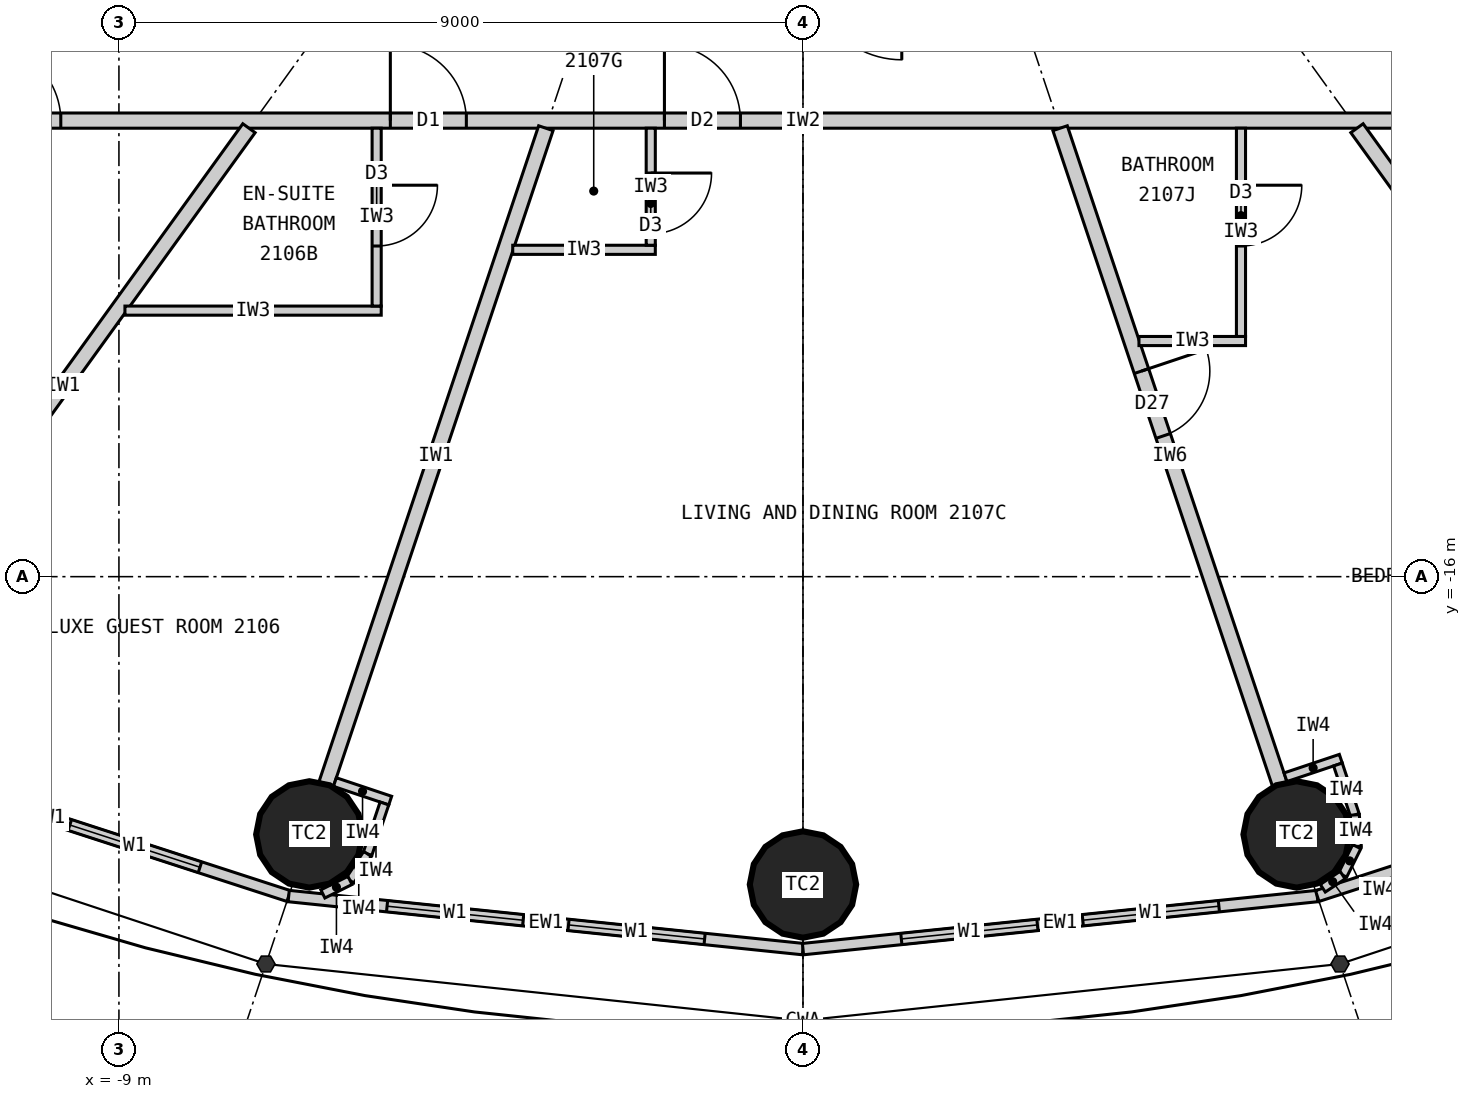
"""IFC4 building model, lengths in metres.
Left out: names, types, materials, properties, quantities, classifications, styles, units other than length and angle.
Written with IfcOpenShell. Run it as: python <this file> out.ifc"""

import sys

from ifc_helpers import new_model, si_unit, direction, frame, frame_2d, origin, origin_2d, place, context, subcontext, project, spatial, rectangle, circle, extrude, element, fill, save


model = new_model("IFC4")
c1 = context("Model", 3, precision=1e-05, world=origin(), true_north=direction((0.0, 1.0)))
c2 = subcontext(c1, "Body", "Model", "MODEL_VIEW")
j1 = project(units=[si_unit("LENGTHUNIT", "METRE"), si_unit("PLANEANGLEUNIT", "RADIAN")], contexts=[c1])
p1 = place(None, origin())
s1 = spatial("IfcSite", under=j1, at=p1, CompositionType="ELEMENT")
p2 = place(p1, origin())
s2 = spatial("IfcBuilding", under=s1, at=p2, CompositionType="ELEMENT")
p3 = place(p2, frame((0.0, 0.0, 83.7)))
s3 = spatial("IfcBuildingStorey", under=s2, at=p3, CompositionType="ELEMENT", Elevation=83.7)
for number, where, z_axis, x_axis in (
    (1, (-6.495, -19.391, 0.0), (0.0, 0.0, 1.0), (1.0, 0.0, 0.0)),
    (2, (0.0, -20.05, 0.0), (0.0, 0.0, 1.0), (1.0, 0.0, 0.0)),
    (3, (6.495, -19.391, 0.0), (0.0, 0.0, 1.0), (1.0, 0.0, 0.0)),
):
    element("IfcColumn", number, at=place(p3, frame(where, z_axis=z_axis, x_axis=x_axis)), inside=s3, PredefinedType="COLUMN", context=c2, shape_type="SweptSolid", body=[
        extrude(circle(Radius=0.7, at=origin_2d()), origin(), (0.0, 0.0, 1.0), 3.3),
    ])
p4 = place(p3, frame((-13.096, -18.147, 0.0), z_axis=(0.0, 0.0, 1.0), x_axis=(0.951137534625, -0.308767534285, 0.0)))
e4 = element("IfcWall", 4, at=p4, inside=s3, PredefinedType="ELEMENTEDWALL", context=c2, shape_type="SweptSolid", body=[
    extrude(rectangle(XDim=6.655, YDim=0.15, at=frame_2d((3.328, 0.0))), origin(), (0.0, 0.0, 1.0), 3.12),
])
p5 = place(p4, frame((1.228, 0.0, 0.9)))
e5 = element("IfcOpeningElement", 5, at=p5, cuts=e4, PredefinedType="OPENING", context=c2, shape_type="SweptSolid", body=[
    extrude(rectangle(XDim=1.8, YDim=1.9, at=frame_2d((0.9, 0.95))), frame((0.0, 0.085, 0.0), z_axis=(0.0, -1.0, 0.0), x_axis=(1.0, 0.0, 0.0)), (0.0, 0.0, 1.0), 0.17),
])
p6 = place(p4, frame((3.628, 0.0, 0.9)))
e6 = element("IfcOpeningElement", 6, at=p6, cuts=e4, PredefinedType="OPENING", context=c2, shape_type="SweptSolid", body=[
    extrude(rectangle(XDim=1.8, YDim=1.9, at=frame_2d((0.9, 0.95))), frame((0.0, 0.085, 0.0), z_axis=(0.0, -1.0, 0.0), x_axis=(1.0, 0.0, 0.0)), (0.0, 0.0, 1.0), 0.17),
])
p7 = place(p3, frame((-6.766, -20.202, 0.0), z_axis=(0.0, 0.0, 1.0), x_axis=(0.994721394369, -0.102612609291, 0.0)))
e7 = element("IfcWall", 7, at=p7, inside=s3, PredefinedType="ELEMENTEDWALL", context=c2, shape_type="SweptSolid", body=[
    extrude(rectangle(XDim=6.802, YDim=0.15, at=frame_2d((3.401, 0.0))), origin(), (0.0, 0.0, 1.0), 3.12),
])
p8 = place(p7, frame((1.301, 0.0, 0.9)))
e8 = element("IfcOpeningElement", 8, at=p8, cuts=e7, PredefinedType="OPENING", context=c2, shape_type="SweptSolid", body=[
    extrude(rectangle(XDim=1.8, YDim=1.9, at=frame_2d((0.9, 0.95))), frame((0.0, 0.085, 0.0), z_axis=(0.0, -1.0, 0.0), x_axis=(1.0, 0.0, 0.0)), (0.0, 0.0, 1.0), 0.17),
])
p9 = place(p7, frame((3.701, 0.0, 0.9)))
e9 = element("IfcOpeningElement", 9, at=p9, cuts=e7, PredefinedType="OPENING", context=c2, shape_type="SweptSolid", body=[
    extrude(rectangle(XDim=1.8, YDim=1.9, at=frame_2d((0.9, 0.95))), frame((0.0, 0.085, 0.0), z_axis=(0.0, -1.0, 0.0), x_axis=(1.0, 0.0, 0.0)), (0.0, 0.0, 1.0), 0.17),
])
p10 = place(p3, frame((0.0, -20.9, 0.0), z_axis=(0.0, 0.0, 1.0), x_axis=(0.994721394369, 0.102612609291, 0.0)))
e10 = element("IfcWall", 10, at=p10, inside=s3, PredefinedType="ELEMENTEDWALL", context=c2, shape_type="SweptSolid", body=[
    extrude(rectangle(XDim=6.802, YDim=0.15, at=frame_2d((3.401, 0.0))), origin(), (0.0, 0.0, 1.0), 3.12),
])
p11 = place(p10, frame((1.301, 0.0, 0.9)))
e11 = element("IfcOpeningElement", 11, at=p11, cuts=e10, PredefinedType="OPENING", context=c2, shape_type="SweptSolid", body=[
    extrude(rectangle(XDim=1.8, YDim=1.9, at=frame_2d((0.9, 0.95))), frame((0.0, 0.085, 0.0), z_axis=(0.0, -1.0, 0.0), x_axis=(1.0, 0.0, 0.0)), (0.0, 0.0, 1.0), 0.17),
])
p12 = place(p10, frame((3.701, 0.0, 0.9)))
e12 = element("IfcOpeningElement", 12, at=p12, cuts=e10, PredefinedType="OPENING", context=c2, shape_type="SweptSolid", body=[
    extrude(rectangle(XDim=1.8, YDim=1.9, at=frame_2d((0.9, 0.95))), frame((0.0, 0.085, 0.0), z_axis=(0.0, -1.0, 0.0), x_axis=(1.0, 0.0, 0.0)), (0.0, 0.0, 1.0), 0.17),
])
p13 = place(p3, frame((6.766, -20.202, 0.0), z_axis=(0.0, 0.0, 1.0), x_axis=(0.951137534625, 0.308767534285, 0.0)))
e13 = element("IfcWall", 13, at=p13, inside=s3, PredefinedType="ELEMENTEDWALL", context=c2, shape_type="SweptSolid", body=[
    extrude(rectangle(XDim=6.655, YDim=0.15, at=frame_2d((3.328, 0.0))), origin(), (0.0, 0.0, 1.0), 3.12),
])
p14 = place(p13, frame((1.228, 0.0, 0.9)))
e14 = element("IfcOpeningElement", 14, at=p14, cuts=e13, PredefinedType="OPENING", context=c2, shape_type="SweptSolid", body=[
    extrude(rectangle(XDim=1.8, YDim=1.9, at=frame_2d((0.9, 0.95))), frame((0.0, 0.085, 0.0), z_axis=(0.0, -1.0, 0.0), x_axis=(1.0, 0.0, 0.0)), (0.0, 0.0, 1.0), 0.17),
])
p15 = place(p13, frame((3.628, 0.0, 0.9)))
e15 = element("IfcOpeningElement", 15, at=p15, cuts=e13, PredefinedType="OPENING", context=c2, shape_type="SweptSolid", body=[
    extrude(rectangle(XDim=1.8, YDim=1.9, at=frame_2d((0.9, 0.95))), frame((0.0, 0.085, 0.0), z_axis=(0.0, -1.0, 0.0), x_axis=(1.0, 0.0, 0.0)), (0.0, 0.0, 1.0), 0.17),
])
p16 = place(p3, frame((14.1, -10.0, 0.0), z_axis=(0.0, 0.0, 1.0), x_axis=(-1.0, 0.0, 0.0)))
e16 = element("IfcWall", 16, at=p16, inside=s3, PredefinedType="PARTITIONING", context=c2, shape_type="SweptSolid", body=[
    extrude(rectangle(XDim=28.2, YDim=0.2, at=frame_2d((14.1, 0.0))), origin(), (0.0, 0.0, 1.0), 3.12),
])
p17 = place(p16, frame((23.865, 0.0, 0.0)))
e17 = element("IfcOpeningElement", 17, at=p17, cuts=e16, PredefinedType="OPENING", context=c2, shape_type="SweptSolid", body=[
    extrude(rectangle(XDim=1.0, YDim=2.2, at=frame_2d((0.5, 1.1))), frame((0.0, 0.11, 0.0), z_axis=(0.0, -1.0, 0.0), x_axis=(1.0, 0.0, 0.0)), (0.0, 0.0, 1.0), 0.22),
])
p18 = place(p16, frame((18.529, 0.0, 0.0)))
e18 = element("IfcOpeningElement", 18, at=p18, cuts=e16, PredefinedType="OPENING", context=c2, shape_type="SweptSolid", body=[
    extrude(rectangle(XDim=1.0, YDim=2.2, at=frame_2d((0.5, 1.1))), frame((0.0, 0.11, 0.0), z_axis=(0.0, -1.0, 0.0), x_axis=(1.0, 0.0, 0.0)), (0.0, 0.0, 1.0), 0.22),
])
p19 = place(p16, frame((14.923, 0.0, 0.0)))
e19 = element("IfcOpeningElement", 19, at=p19, cuts=e16, PredefinedType="OPENING", context=c2, shape_type="SweptSolid", body=[
    extrude(rectangle(XDim=1.0, YDim=2.2, at=frame_2d((0.5, 1.1))), frame((0.0, 0.11, 0.0), z_axis=(0.0, -1.0, 0.0), x_axis=(1.0, 0.0, 0.0)), (0.0, 0.0, 1.0), 0.22),
])
p20 = place(p16, frame((2.801, 0.0, 0.0)))
e20 = element("IfcOpeningElement", 20, at=p20, cuts=e16, PredefinedType="OPENING", context=c2, shape_type="SweptSolid", body=[
    extrude(rectangle(XDim=1.0, YDim=2.2, at=frame_2d((0.5, 1.1))), frame((0.0, 0.11, 0.0), z_axis=(0.0, -1.0, 0.0), x_axis=(1.0, 0.0, 0.0)), (0.0, 0.0, 1.0), 0.22),
])
p21 = place(p3, frame((-7.289, -10.1, 0.0), z_axis=(0.0, 0.0, 1.0), x_axis=(-0.585198353053, -0.810890182197, 0.0)))
e21 = element("IfcWall", 21, at=p21, inside=s3, PredefinedType="PARTITIONING", context=c2, shape_type="SweptSolid", body=[
    extrude(rectangle(XDim=8.36, YDim=0.2, at=frame_2d((4.18, 0.0))), origin(), (0.0, 0.0, 1.0), 2.32),
])
p22 = place(p3, frame((-3.383, -10.1, 0.0), z_axis=(0.0, 0.0, 1.0), x_axis=(-0.31759592231, -0.948226149256, 0.0)))
e22 = element("IfcWall", 22, at=p22, inside=s3, PredefinedType="PARTITIONING", context=c2, shape_type="SweptSolid", body=[
    extrude(rectangle(XDim=9.098, YDim=0.2, at=frame_2d((4.549, 0.0))), origin(), (0.0, 0.0, 1.0), 2.32),
])
p23 = place(p3, frame((3.383, -10.1, 0.0), z_axis=(0.0, 0.0, 1.0), x_axis=(0.31759592231, -0.948226149256, 0.0)))
e23 = element("IfcWall", 23, at=p23, inside=s3, PredefinedType="PARTITIONING", context=c2, shape_type="SweptSolid", body=[
    extrude(rectangle(XDim=9.098, YDim=0.2, at=frame_2d((4.549, 0.0))), origin(), (0.0, 0.0, 1.0), 2.32),
])
p24 = place(p23, frame((3.37, 0.0, 0.0)))
e24 = element("IfcOpeningElement", 24, at=p24, cuts=e23, PredefinedType="OPENING", context=c2, shape_type="SweptSolid", body=[
    extrude(rectangle(XDim=0.9, YDim=2.1, at=frame_2d((0.45, 1.05))), frame((0.0, 0.11, 0.0), z_axis=(0.0, -1.0, 0.0), x_axis=(1.0, 0.0, 0.0)), (0.0, 0.0, 1.0), 0.22),
])
p25 = place(p3, frame((7.289, -10.1, 0.0), z_axis=(0.0, 0.0, 1.0), x_axis=(0.585198353053, -0.810890182197, 0.0)))
e25 = element("IfcWall", 25, at=p25, inside=s3, PredefinedType="PARTITIONING", context=c2, shape_type="SweptSolid", body=[
    extrude(rectangle(XDim=8.36, YDim=0.2, at=frame_2d((4.18, 0.0))), origin(), (0.0, 0.0, 1.0), 2.32),
])
p26 = place(p3, frame((-8.921, -12.5, 0.0), z_axis=(0.0, 0.0, 1.0), x_axis=(1.0, 0.0, 0.0)))
e26 = element("IfcWall", 26, at=p26, inside=s3, PredefinedType="PARTITIONING", context=c2, shape_type="SweptSolid", body=[
    extrude(rectangle(XDim=3.372, YDim=0.12, at=frame_2d((1.686, 0.0))), origin(), (0.0, 0.0, 1.0), 3.12),
])
p27 = place(p3, frame((-5.609, -10.1, 0.0), z_axis=(0.0, 0.0, 1.0), x_axis=(0.0, -1.0, 0.0)))
e27 = element("IfcWall", 27, at=p27, inside=s3, PredefinedType="PARTITIONING", context=c2, shape_type="SweptSolid", body=[
    extrude(rectangle(XDim=2.34, YDim=0.12, at=frame_2d((1.17, 0.0))), origin(), (0.0, 0.0, 1.0), 3.12),
])
p28 = place(p27, frame((0.75, 0.0, 0.0)))
e28 = element("IfcOpeningElement", 28, at=p28, cuts=e27, PredefinedType="OPENING", context=c2, shape_type="SweptSolid", body=[
    extrude(rectangle(XDim=0.8, YDim=2.1, at=frame_2d((0.4, 1.05))), frame((0.0, 0.07, 0.0), z_axis=(0.0, -1.0, 0.0), x_axis=(1.0, 0.0, 0.0)), (0.0, 0.0, 1.0), 0.14),
])
p29 = place(p3, frame((-3.819, -11.7, 0.0), z_axis=(0.0, 0.0, 1.0), x_axis=(1.0, 0.0, 0.0)))
e29 = element("IfcWall", 29, at=p29, inside=s3, PredefinedType="PARTITIONING", context=c2, shape_type="SweptSolid", body=[
    extrude(rectangle(XDim=1.876, YDim=0.12, at=frame_2d((0.938, 0.0))), origin(), (0.0, 0.0, 1.0), 3.12),
])
p30 = place(p3, frame((-2.003, -10.1, 0.0), z_axis=(0.0, 0.0, 1.0), x_axis=(0.0, -1.0, 0.0)))
e30 = element("IfcWall", 30, at=p30, inside=s3, PredefinedType="PARTITIONING", context=c2, shape_type="SweptSolid", body=[
    extrude(rectangle(XDim=1.54, YDim=0.12, at=frame_2d((0.77, 0.0))), origin(), (0.0, 0.0, 1.0), 3.12),
])
p31 = place(p30, frame((0.59, 0.0, 0.0)))
e31 = element("IfcOpeningElement", 31, at=p31, cuts=e30, PredefinedType="OPENING", context=c2, shape_type="SweptSolid", body=[
    extrude(rectangle(XDim=0.8, YDim=2.1, at=frame_2d((0.4, 1.05))), frame((0.0, 0.07, 0.0), z_axis=(0.0, -1.0, 0.0), x_axis=(1.0, 0.0, 0.0)), (0.0, 0.0, 1.0), 0.14),
])
p32 = place(p3, frame((4.421, -12.9, 0.0), z_axis=(0.0, 0.0, 1.0), x_axis=(1.0, 0.0, 0.0)))
e32 = element("IfcWall", 32, at=p32, inside=s3, PredefinedType="PARTITIONING", context=c2, shape_type="SweptSolid", body=[
    extrude(rectangle(XDim=1.402, YDim=0.12, at=frame_2d((0.701, 0.0))), origin(), (0.0, 0.0, 1.0), 3.12),
])
p33 = place(p3, frame((5.763, -10.1, 0.0), z_axis=(0.0, 0.0, 1.0), x_axis=(0.0, -1.0, 0.0)))
e33 = element("IfcWall", 33, at=p33, inside=s3, PredefinedType="PARTITIONING", context=c2, shape_type="SweptSolid", body=[
    extrude(rectangle(XDim=2.74, YDim=0.12, at=frame_2d((1.37, 0.0))), origin(), (0.0, 0.0, 1.0), 3.12),
])
p34 = place(p33, frame((0.75, 0.0, 0.0)))
e34 = element("IfcOpeningElement", 34, at=p34, cuts=e33, PredefinedType="OPENING", context=c2, shape_type="SweptSolid", body=[
    extrude(rectangle(XDim=0.8, YDim=2.1, at=frame_2d((0.4, 1.05))), frame((0.0, 0.07, 0.0), z_axis=(0.0, -1.0, 0.0), x_axis=(1.0, 0.0, 0.0)), (0.0, 0.0, 1.0), 0.14),
])
p35 = place(p3, frame((-6.159, -18.702, 0.0), z_axis=(0.0, 0.0, 1.0), x_axis=(0.948173154049, -0.31775410295, 0.0)))
e35 = element("IfcWall", 35, at=p35, inside=s3, PredefinedType="PARTITIONING", context=c2, shape_type="SweptSolid", body=[
    extrude(rectangle(XDim=0.768, YDim=0.12, at=frame_2d((0.384, 0.0))), origin(), (0.0, 0.0, 1.0), 3.12),
])
p36 = place(p3, frame((-5.507, -18.984, 0.0), z_axis=(0.0, 0.0, 1.0), x_axis=(-0.317692050622, -0.948193946918, 0.0)))
e36 = element("IfcWall", 36, at=p36, inside=s3, PredefinedType="PARTITIONING", context=c2, shape_type="SweptSolid", body=[
    extrude(rectangle(XDim=0.7, YDim=0.12, at=frame_2d((0.35, 0.0))), origin(), (0.0, 0.0, 1.0), 3.12),
])
p37 = place(p3, frame((-5.729, -19.648, 0.0), z_axis=(0.0, 0.0, 1.0), x_axis=(-0.552135764955, -0.833754218615, 0.0)))
e37 = element("IfcWall", 37, at=p37, inside=s3, PredefinedType="PARTITIONING", context=c2, shape_type="SweptSolid", body=[
    extrude(rectangle(XDim=0.418, YDim=0.12, at=frame_2d((0.209, 0.0))), origin(), (0.0, 0.0, 1.0), 3.12),
])
p38 = place(p3, frame((-5.96, -19.996, 0.0), z_axis=(0.0, 0.0, 1.0), x_axis=(-0.895160725913, -0.445743507842, 0.0)))
e38 = element("IfcWall", 38, at=p38, inside=s3, PredefinedType="PARTITIONING", context=c2, shape_type="SweptSolid", body=[
    extrude(rectangle(XDim=0.399, YDim=0.12, at=frame_2d((0.199, 0.0))), origin(), (0.0, 0.0, 1.0), 3.12),
])
p39 = place(p3, frame((6.348, -18.639, 0.0), z_axis=(0.0, 0.0, 1.0), x_axis=(0.948268951266, 0.317468102437, 0.0)))
e39 = element("IfcWall", 39, at=p39, inside=s3, PredefinedType="PARTITIONING", context=c2, shape_type="SweptSolid", body=[
    extrude(rectangle(XDim=0.768, YDim=0.12, at=frame_2d((0.384, 0.0))), origin(), (0.0, 0.0, 1.0), 3.12),
])
p40 = place(p3, frame((7.038, -18.471, 0.0), z_axis=(0.0, 0.0, 1.0), x_axis=(0.317378466199, -0.9482989556, 0.0)))
e40 = element("IfcWall", 40, at=p40, inside=s3, PredefinedType="PARTITIONING", context=c2, shape_type="SweptSolid", body=[
    extrude(rectangle(XDim=0.7, YDim=0.12, at=frame_2d((0.35, 0.0))), origin(), (0.0, 0.0, 1.0), 3.12),
])
p41 = place(p3, frame((7.26, -19.135, 0.0), z_axis=(0.0, 0.0, 1.0), x_axis=(0.0613238046, -0.99811792439, 0.0)))
e41 = element("IfcWall", 41, at=p41, inside=s3, PredefinedType="PARTITIONING", context=c2, shape_type="SweptSolid", body=[
    extrude(rectangle(XDim=0.418, YDim=0.12, at=frame_2d((0.209, 0.0))), origin(), (0.0, 0.0, 1.0), 3.12),
])
p42 = place(p3, frame((7.286, -19.552, 0.0), z_axis=(0.0, 0.0, 1.0), x_axis=(-0.445810757773, -0.89512723579, 0.0)))
e42 = element("IfcWall", 42, at=p42, inside=s3, PredefinedType="PARTITIONING", context=c2, shape_type="SweptSolid", body=[
    extrude(rectangle(XDim=0.418, YDim=0.12, at=frame_2d((0.209, 0.0))), origin(), (0.0, 0.0, 1.0), 3.12),
])
p43 = place(p3, frame((7.1, -19.926, 0.0), z_axis=(0.0, 0.0, 1.0), x_axis=(-0.833488262509, -0.552537162787, 0.0)))
e43 = element("IfcWall", 43, at=p43, inside=s3, PredefinedType="PARTITIONING", context=c2, shape_type="SweptSolid", body=[
    extrude(rectangle(XDim=0.313, YDim=0.12, at=frame_2d((0.156, 0.0))), origin(), (0.0, 0.0, 1.0), 3.12),
])
p44 = place(p6, origin())
e44 = element("IfcWindow", 44, at=p44, inside=s3, PartitioningType="SINGLE_PANEL", PredefinedType="WINDOW", context=c2, shape_type="SweptSolid", body=[
    extrude(rectangle(XDim=1.8, YDim=1.9, at=frame_2d((0.9, 0.95))), frame((0.0, 0.03, 0.0), z_axis=(0.0, -1.0, 0.0), x_axis=(1.0, 0.0, 0.0)), (0.0, 0.0, 1.0), 0.06),
])
fill(e6, e44)
p45 = place(p8, origin())
e45 = element("IfcWindow", 45, at=p45, inside=s3, PartitioningType="SINGLE_PANEL", PredefinedType="WINDOW", context=c2, shape_type="SweptSolid", body=[
    extrude(rectangle(XDim=1.8, YDim=1.9, at=frame_2d((0.9, 0.95))), frame((0.0, 0.03, 0.0), z_axis=(0.0, -1.0, 0.0), x_axis=(1.0, 0.0, 0.0)), (0.0, 0.0, 1.0), 0.06),
])
fill(e8, e45)
p46 = place(p9, origin())
e46 = element("IfcWindow", 46, at=p46, inside=s3, PartitioningType="SINGLE_PANEL", PredefinedType="WINDOW", context=c2, shape_type="SweptSolid", body=[
    extrude(rectangle(XDim=1.8, YDim=1.9, at=frame_2d((0.9, 0.95))), frame((0.0, 0.03, 0.0), z_axis=(0.0, -1.0, 0.0), x_axis=(1.0, 0.0, 0.0)), (0.0, 0.0, 1.0), 0.06),
])
fill(e9, e46)
p47 = place(p11, origin())
e47 = element("IfcWindow", 47, at=p47, inside=s3, PartitioningType="SINGLE_PANEL", PredefinedType="WINDOW", context=c2, shape_type="SweptSolid", body=[
    extrude(rectangle(XDim=1.8, YDim=1.9, at=frame_2d((0.9, 0.95))), frame((0.0, 0.03, 0.0), z_axis=(0.0, -1.0, 0.0), x_axis=(1.0, 0.0, 0.0)), (0.0, 0.0, 1.0), 0.06),
])
fill(e11, e47)
p48 = place(p12, origin())
e48 = element("IfcWindow", 48, at=p48, inside=s3, PartitioningType="SINGLE_PANEL", PredefinedType="WINDOW", context=c2, shape_type="SweptSolid", body=[
    extrude(rectangle(XDim=1.8, YDim=1.9, at=frame_2d((0.9, 0.95))), frame((0.0, 0.03, 0.0), z_axis=(0.0, -1.0, 0.0), x_axis=(1.0, 0.0, 0.0)), (0.0, 0.0, 1.0), 0.06),
])
fill(e12, e48)
p49 = place(p17, origin())
e49 = element("IfcDoor", 49, at=p49, inside=s3, OperationType="SINGLE_SWING_RIGHT", PredefinedType="DOOR", context=c2, shape_type="SweptSolid", body=[
    extrude(rectangle(XDim=1.0, YDim=2.2, at=frame_2d((0.5, 1.1))), frame((0.0, 0.025, 0.0), z_axis=(0.0, -1.0, 0.0), x_axis=(1.0, 0.0, 0.0)), (0.0, 0.0, 1.0), 0.05),
])
fill(e17, e49)
p50 = place(p28, origin())
e50 = element("IfcDoor", 50, at=p50, inside=s3, OperationType="SINGLE_SWING_LEFT", PredefinedType="DOOR", context=c2, shape_type="SweptSolid", body=[
    extrude(rectangle(XDim=0.8, YDim=2.1, at=frame_2d((0.4, 1.05))), frame((0.0, 0.025, 0.0), z_axis=(0.0, -1.0, 0.0), x_axis=(1.0, 0.0, 0.0)), (0.0, 0.0, 1.0), 0.05),
])
fill(e28, e50)
p51 = place(p18, origin())
e51 = element("IfcDoor", 51, at=p51, inside=s3, OperationType="SINGLE_SWING_RIGHT", PredefinedType="DOOR", context=c2, shape_type="SweptSolid", body=[
    extrude(rectangle(XDim=1.0, YDim=2.2, at=frame_2d((0.5, 1.1))), frame((0.0, 0.025, 0.0), z_axis=(0.0, -1.0, 0.0), x_axis=(1.0, 0.0, 0.0)), (0.0, 0.0, 1.0), 0.05),
])
fill(e18, e51)
p52 = place(p31, origin())
e52 = element("IfcDoor", 52, at=p52, inside=s3, OperationType="SINGLE_SWING_LEFT", PredefinedType="DOOR", context=c2, shape_type="SweptSolid", body=[
    extrude(rectangle(XDim=0.8, YDim=2.1, at=frame_2d((0.4, 1.05))), frame((0.0, 0.025, 0.0), z_axis=(0.0, -1.0, 0.0), x_axis=(1.0, 0.0, 0.0)), (0.0, 0.0, 1.0), 0.05),
])
fill(e31, e52)
p53 = place(p19, origin())
e53 = element("IfcDoor", 53, at=p53, inside=s3, OperationType="SINGLE_SWING_RIGHT", PredefinedType="DOOR", context=c2, shape_type="SweptSolid", body=[
    extrude(rectangle(XDim=1.0, YDim=2.2, at=frame_2d((0.5, 1.1))), frame((0.0, 0.025, 0.0), z_axis=(0.0, -1.0, 0.0), x_axis=(1.0, 0.0, 0.0)), (0.0, 0.0, 1.0), 0.05),
])
fill(e19, e53)
p54 = place(p34, origin())
e54 = element("IfcDoor", 54, at=p54, inside=s3, OperationType="SINGLE_SWING_LEFT", PredefinedType="DOOR", context=c2, shape_type="SweptSolid", body=[
    extrude(rectangle(XDim=0.8, YDim=2.1, at=frame_2d((0.4, 1.05))), frame((0.0, 0.025, 0.0), z_axis=(0.0, -1.0, 0.0), x_axis=(1.0, 0.0, 0.0)), (0.0, 0.0, 1.0), 0.05),
])
fill(e34, e54)
p55 = place(p24, origin())
e55 = element("IfcDoor", 55, at=p55, inside=s3, OperationType="SINGLE_SWING_LEFT", PredefinedType="DOOR", context=c2, shape_type="SweptSolid", body=[
    extrude(rectangle(XDim=0.9, YDim=2.1, at=frame_2d((0.45, 1.05))), frame((0.0, 0.025, 0.0), z_axis=(0.0, -1.0, 0.0), x_axis=(1.0, 0.0, 0.0)), (0.0, 0.0, 1.0), 0.05),
])
fill(e24, e55)
save(model, sys.argv[1])
